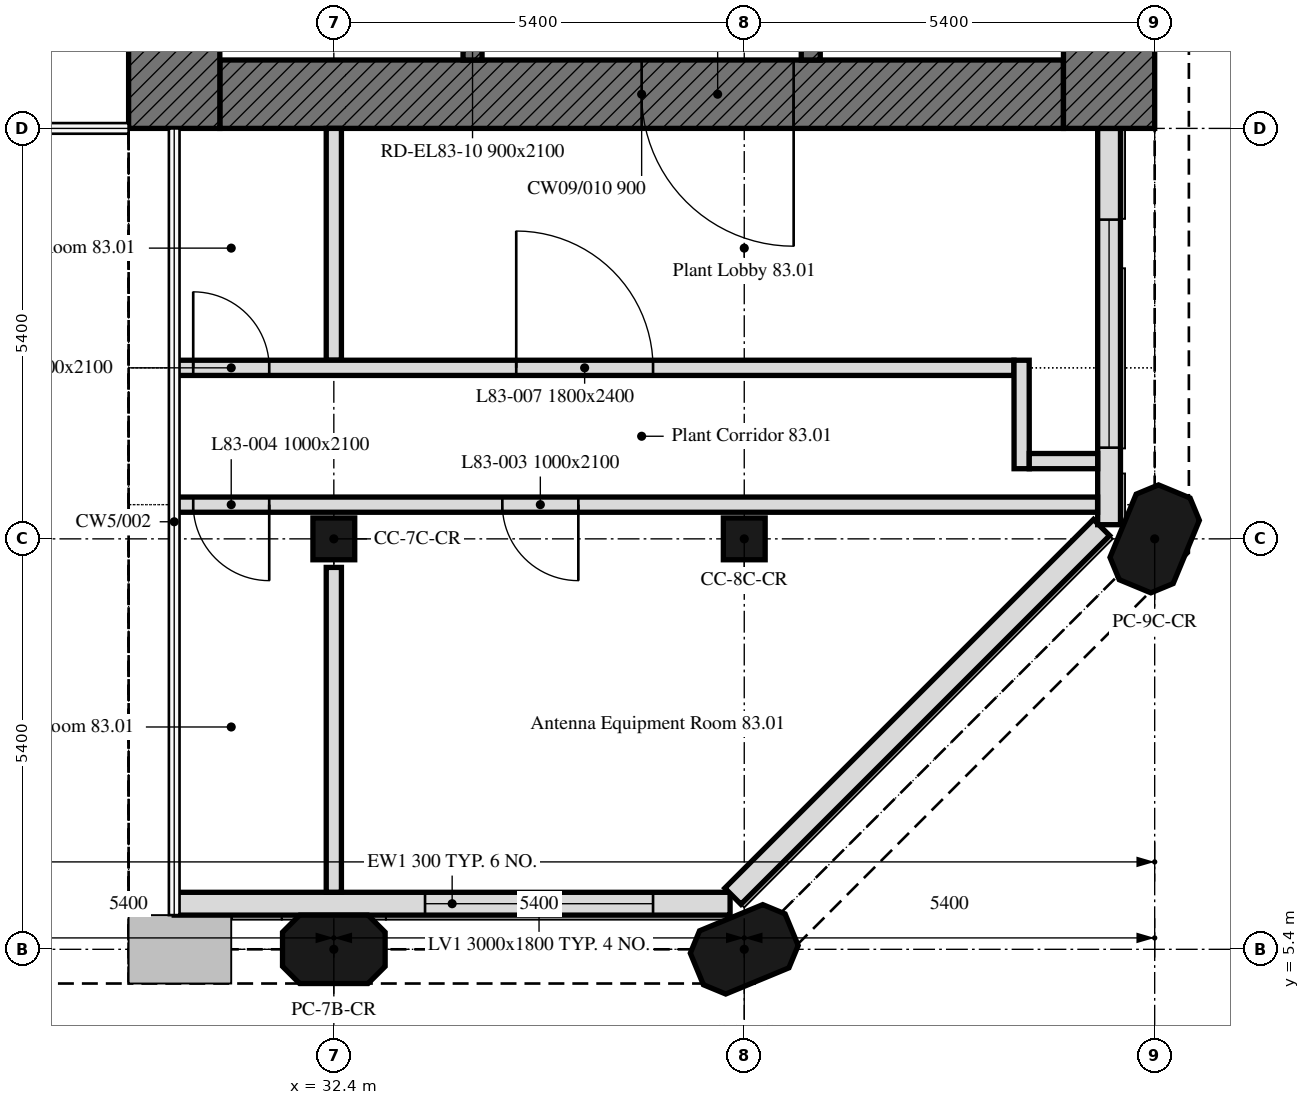
"""IFC4 building model, lengths in metres.
Left out: names, types, materials, properties, quantities, classifications, styles, units other than length and angle.
Written with IfcOpenShell. Run it as: python <this file> out.ifc"""

import sys

from ifc_helpers import new_model, si_unit, direction, frame, frame_2d, origin, origin_2d, place, context, subcontext, project, spatial, polyline, rectangle, outline, extrude, element, fill, save


model = new_model("IFC4")
c1 = context("Model", 3, precision=1e-05, world=origin(), true_north=direction((0.0, 1.0)))
c2 = subcontext(c1, "Body", "Model", "MODEL_VIEW")
j1 = project(units=[si_unit("LENGTHUNIT", "METRE"), si_unit("PLANEANGLEUNIT", "RADIAN")], contexts=[c1])
p1 = place(None, origin())
s1 = spatial("IfcSite", under=j1, at=p1, CompositionType="ELEMENT")
p2 = place(p1, origin())
s2 = spatial("IfcBuilding", under=s1, at=p2, CompositionType="ELEMENT")
p3 = place(p2, frame((0.0, 0.0, 335.2)))
s3 = spatial("IfcBuildingStorey", under=s2, at=p3, CompositionType="ELEMENT", Elevation=335.2)
for number, where, z_axis, x_axis in (
    (1, (32.4, 5.4, 0.0), (0.0, 0.0, 1.0), (1.0, 0.0, 0.0)),
    (2, (37.8, 5.4, 0.0), (0.0, 0.0, 1.0), (0.924, 0.383, 0.0)),
):
    element("IfcColumn", number, at=place(p3, frame(where, z_axis=z_axis, x_axis=x_axis)), inside=s3, PredefinedType="COLUMN", context=c2, shape_type="SweptSolid", body=[
        extrude(outline(polyline([(-0.45, -0.45), (0.45, -0.45), (0.675, -0.225), (0.675, 0.225), (0.45, 0.45), (-0.45, 0.45), (-0.675, 0.225), (-0.675, -0.225), (-0.45, -0.45)])), origin(), (0.0, 0.0, 1.0), 2.7),
    ])
for number, where, z_axis, x_axis in (
    (3, (32.4, 10.8, 0.0), (0.0, 0.0, 1.0), (1.0, 0.0, 0.0)),
    (4, (37.8, 10.8, 0.0), (0.0, 0.0, 1.0), (1.0, 0.0, 0.0)),
):
    element("IfcColumn", number, at=place(p3, frame(where, z_axis=z_axis, x_axis=x_axis)), inside=s3, PredefinedType="COLUMN", context=c2, shape_type="SweptSolid", body=[
        extrude(rectangle(XDim=0.55, YDim=0.55, at=origin_2d()), origin(), (0.0, 0.0, 1.0), 2.7),
    ])
p4 = place(p3, frame((43.2, 10.8, 0.0), z_axis=(0.0, 0.0, 1.0), x_axis=(0.382683432365, 0.923879532511, 0.0)))
e5 = element("IfcColumn", 5, at=p4, inside=s3, PredefinedType="COLUMN", context=c2, shape_type="SweptSolid", body=[
    extrude(outline(polyline([(-0.45, -0.45), (0.45, -0.45), (0.675, -0.225), (0.675, 0.225), (0.45, 0.45), (-0.45, 0.45), (-0.675, 0.225), (-0.675, -0.225), (-0.45, -0.45)])), origin(), (0.0, 0.0, 1.0), 2.7),
])
p5 = place(p3, frame((30.3, 6.0, 0.0), z_axis=(0.0, 0.0, 1.0), x_axis=(1.0, 0.0, 0.0)))
e6 = element("IfcWall", 6, at=p5, inside=s3, PredefinedType="SOLIDWALL", context=c2, shape_type="SweptSolid", body=[
    extrude(outline(polyline([(0.0, 0.0), (7.313, 0.0), (7.314, 6.217), (6.751, 5.967), (6.188, 5.717), (5.626, 5.467), (5.063, 5.217), (4.501, 4.967), (3.938, 4.717), (3.375, 4.467), (2.813, 4.217), (2.25, 3.967), (1.688, 3.717), (1.125, 3.467), (0.562, 3.217), (0.0, 2.967), (0.0, 0.0)])), frame((0.0, 0.15, 0.0), z_axis=(0.0, -1.0, 0.0), x_axis=(1.0, 0.0, 0.0)), (0.0, 0.0, 1.0), 0.3),
])
p6 = place(p5, frame((3.3, 0.0, 0.6)))
e7 = element("IfcOpeningElement", 7, at=p6, cuts=e6, PredefinedType="OPENING", context=c2, shape_type="SweptSolid", body=[
    extrude(rectangle(XDim=3.0, YDim=1.8, at=frame_2d((1.5, 0.9))), frame((0.0, 0.16, 0.0), z_axis=(0.0, -1.0, 0.0), x_axis=(1.0, 0.0, 0.0)), (0.0, 0.0, 1.0), 0.32),
])
p7 = place(p3, frame((37.65, 6.099, 0.0), z_axis=(0.0, 0.0, 1.0), x_axis=(0.707106781187, 0.707106781187, 0.0)))
e8 = element("IfcWall", 8, at=p7, inside=s3, PredefinedType="SOLIDWALL", context=c2, shape_type="SweptSolid", body=[
    extrude(outline(polyline([(0.0, 0.0), (6.86, 0.0), (6.86, 8.389), (6.288, 8.21), (5.716, 8.03), (5.145, 7.85), (4.573, 7.671), (4.001, 7.491), (3.43, 7.312), (2.858, 7.132), (2.287, 6.952), (1.715, 6.772), (1.143, 6.593), (0.572, 6.413), (0.0, 6.234), (0.0, 0.0)])), frame((0.0, 0.15, 0.0), z_axis=(0.0, -1.0, 0.0), x_axis=(1.0, 0.0, 0.0)), (0.0, 0.0, 1.0), 0.3),
])
p8 = place(p3, frame((42.6, 10.986, 0.0), z_axis=(0.0, 0.0, 1.0), x_axis=(0.0, 1.0, 0.0)))
e9 = element("IfcWall", 9, at=p8, inside=s3, PredefinedType="SOLIDWALL", context=c2, shape_type="SweptSolid", body=[
    extrude(outline(polyline([(0.0, 0.0), (5.214, 0.0), (5.214, 8.433), (4.634, 8.433), (4.055, 8.433), (3.476, 8.433), (2.896, 8.433), (2.317, 8.433), (1.738, 8.433), (1.159, 8.433), (0.579, 8.433), (0.0, 8.433), (0.0, 0.0)])), frame((0.0, 0.15, 0.0), z_axis=(0.0, -1.0, 0.0), x_axis=(1.0, 0.0, 0.0)), (0.0, 0.0, 1.0), 0.3),
])
p9 = place(p8, frame((1.014, 0.0, 0.6)))
e10 = element("IfcOpeningElement", 10, at=p9, cuts=e9, PredefinedType="OPENING", context=c2, shape_type="SweptSolid", body=[
    extrude(rectangle(XDim=3.0, YDim=1.8, at=frame_2d((1.5, 0.9))), frame((0.0, 0.16, 0.0), z_axis=(0.0, -1.0, 0.0), x_axis=(1.0, 0.0, 0.0)), (0.0, 0.0, 1.0), 0.32),
])
p10 = place(p3, frame((42.0, 16.65, 0.0), z_axis=(0.0, 0.0, 1.0), x_axis=(-1.0, 0.0, 0.0)))
e11 = element("IfcWall", 11, at=p10, inside=s3, PredefinedType="SOLIDWALL", context=c2, shape_type="SweptSolid", body=[
    extrude(outline(polyline([(0.0, 0.0), (11.1, 0.0), (11.1, 3.233), (0.0, 8.167), (0.0, 0.0)])), frame((0.0, 0.45, 0.0), z_axis=(0.0, -1.0, 0.0), x_axis=(1.0, 0.0, 0.0)), (0.0, 0.0, 1.0), 0.9),
])
p11 = place(p10, frame((3.55, 0.0, 0.0)))
e12 = element("IfcOpeningElement", 12, at=p11, cuts=e11, PredefinedType="OPENING", context=c2, shape_type="SweptSolid", body=[
    extrude(rectangle(XDim=2.0, YDim=2.4, at=frame_2d((1.0, 1.2))), frame((0.0, 0.45, 0.0), z_axis=(0.0, -1.0, 0.0), x_axis=(1.0, 0.0, 0.0)), (0.0, 0.0, 1.0), 0.9),
])
p12 = place(p3, frame((42.6, 32.4, 0.0), z_axis=(0.0, 0.0, 1.0), x_axis=(0.0, -1.0, 0.0)))
e13 = element("IfcWall", 13, at=p12, inside=s3, PredefinedType="SOLIDWALL", context=c2, shape_type="SweptSolid", body=[
    extrude(rectangle(XDim=16.2, YDim=1.2, at=frame_2d((8.1, 0.0))), origin(), (0.0, 0.0, 1.0), 8.433),
])
p13 = place(p3, frame((30.3, 16.2, 0.0), z_axis=(0.0, 0.0, 1.0), x_axis=(0.0, 1.0, 0.0)))
e14 = element("IfcWall", 14, at=p13, inside=s3, PredefinedType="SOLIDWALL", context=c2, shape_type="SweptSolid", body=[
    extrude(rectangle(XDim=16.2, YDim=1.2, at=frame_2d((8.1, 0.0))), origin(), (0.0, 0.0, 1.0), 2.967),
])
p14 = place(p3, frame((38.675, 17.1, 0.0), z_axis=(0.0, 0.0, 1.0), x_axis=(0.0, 1.0, 0.0)))
e15 = element("IfcWall", 15, at=p14, inside=s3, PredefinedType="SOLIDWALL", context=c2, shape_type="SweptSolid", body=[
    extrude(rectangle(XDim=14.4, YDim=0.25, at=frame_2d((7.2, 0.0))), origin(), (0.0, 0.0, 1.0), 6.689),
])
p15 = place(p14, frame((4.6, 0.0, 0.0)))
e16 = element("IfcOpeningElement", 16, at=p15, cuts=e15, PredefinedType="OPENING", context=c2, shape_type="SweptSolid", body=[
    extrude(rectangle(XDim=1.0, YDim=2.1, at=frame_2d((0.5, 1.05))), frame((0.0, 0.125, 0.0), z_axis=(0.0, -1.0, 0.0), x_axis=(1.0, 0.0, 0.0)), (0.0, 0.0, 1.0), 0.25),
])
p16 = place(p14, frame((7.062, 0.0, 0.0)))
e17 = element("IfcOpeningElement", 17, at=p16, cuts=e15, PredefinedType="OPENING", context=c2, shape_type="SweptSolid", body=[
    extrude(rectangle(XDim=1.2, YDim=2.1, at=frame_2d((0.6, 1.05))), frame((0.0, 0.125, 0.0), z_axis=(0.0, -1.0, 0.0), x_axis=(1.0, 0.0, 0.0)), (0.0, 0.0, 1.0), 0.25),
])
p17 = place(p14, frame((10.106, 0.0, 0.0)))
e18 = element("IfcOpeningElement", 18, at=p17, cuts=e15, PredefinedType="OPENING", context=c2, shape_type="SweptSolid", body=[
    extrude(rectangle(XDim=0.9, YDim=2.1, at=frame_2d((0.45, 1.05))), frame((0.0, 0.125, 0.0), z_axis=(0.0, -1.0, 0.0), x_axis=(1.0, 0.0, 0.0)), (0.0, 0.0, 1.0), 0.25),
])
p18 = place(p14, frame((12.719, 0.0, 0.0)))
e19 = element("IfcOpeningElement", 19, at=p18, cuts=e15, PredefinedType="OPENING", context=c2, shape_type="SweptSolid", body=[
    extrude(rectangle(XDim=0.9, YDim=2.1, at=frame_2d((0.45, 1.05))), frame((0.0, 0.125, 0.0), z_axis=(0.0, -1.0, 0.0), x_axis=(1.0, 0.0, 0.0)), (0.0, 0.0, 1.0), 0.25),
])
p19 = place(p3, frame((34.225, 17.1, 0.0), z_axis=(0.0, 0.0, 1.0), x_axis=(0.0, 1.0, 0.0)))
e20 = element("IfcWall", 20, at=p19, inside=s3, PredefinedType="SOLIDWALL", context=c2, shape_type="SweptSolid", body=[
    extrude(rectangle(XDim=14.4, YDim=0.25, at=frame_2d((7.2, 0.0))), origin(), (0.0, 0.0, 1.0), 4.711),
])
p20 = place(p19, frame((13.15, 0.0, 0.0)))
e21 = element("IfcOpeningElement", 21, at=p20, cuts=e20, PredefinedType="OPENING", context=c2, shape_type="SweptSolid", body=[
    extrude(rectangle(XDim=1.0, YDim=2.1, at=frame_2d((0.5, 1.05))), frame((0.0, 0.125, 0.0), z_axis=(0.0, -1.0, 0.0), x_axis=(1.0, 0.0, 0.0)), (0.0, 0.0, 1.0), 0.25),
])
p21 = place(p19, frame((0.24, 0.0, 0.0)))
e22 = element("IfcOpeningElement", 22, at=p21, cuts=e20, PredefinedType="OPENING", context=c2, shape_type="SweptSolid", body=[
    extrude(rectangle(XDim=0.9, YDim=2.1, at=frame_2d((0.45, 1.05))), frame((0.0, 0.125, 0.0), z_axis=(0.0, -1.0, 0.0), x_axis=(1.0, 0.0, 0.0)), (0.0, 0.0, 1.0), 0.25),
])
p22 = place(p19, frame((2.74, 0.0, 0.0)))
e23 = element("IfcOpeningElement", 23, at=p22, cuts=e20, PredefinedType="OPENING", context=c2, shape_type="SweptSolid", body=[
    extrude(rectangle(XDim=0.9, YDim=2.1, at=frame_2d((0.45, 1.05))), frame((0.0, 0.125, 0.0), z_axis=(0.0, -1.0, 0.0), x_axis=(1.0, 0.0, 0.0)), (0.0, 0.0, 1.0), 0.25),
])
p23 = place(p19, frame((6.175, 0.0, 0.0)))
e24 = element("IfcOpeningElement", 24, at=p23, cuts=e20, PredefinedType="OPENING", context=c2, shape_type="SweptSolid", body=[
    extrude(rectangle(XDim=0.9, YDim=2.1, at=frame_2d((0.45, 1.05))), frame((0.0, 0.125, 0.0), z_axis=(0.0, -1.0, 0.0), x_axis=(1.0, 0.0, 0.0)), (0.0, 0.0, 1.0), 0.25),
])
p24 = place(p3, frame((32.4, 10.424, 0.0), z_axis=(0.0, 0.0, 1.0), x_axis=(0.0, -1.0, 0.0)))
e25 = element("IfcWall", 25, at=p24, inside=s3, PredefinedType="PARTITIONING", context=c2, shape_type="SweptSolid", body=[
    extrude(rectangle(XDim=4.273, YDim=0.2, at=frame_2d((2.137, 0.0))), origin(), (0.0, 0.0, 1.0), 3.9),
])
p25 = place(p3, frame((42.449, 11.25, 0.0), z_axis=(0.0, 0.0, 1.0), x_axis=(-1.0, 0.0, 0.0)))
e26 = element("IfcWall", 26, at=p25, inside=s3, PredefinedType="PARTITIONING", context=c2, shape_type="SweptSolid", body=[
    extrude(outline(polyline([(0.0, 0.0), (12.149, 0.0), (12.149, 2.967), (0.0, 8.366), (0.0, 0.0)])), frame((0.0, 0.1, 0.0), z_axis=(0.0, -1.0, 0.0), x_axis=(1.0, 0.0, 0.0)), (0.0, 0.0, 1.0), 0.2),
])
p26 = place(p25, frame((6.832, 0.0, 0.0)))
e27 = element("IfcOpeningElement", 27, at=p26, cuts=e26, PredefinedType="OPENING", context=c2, shape_type="SweptSolid", body=[
    extrude(rectangle(XDim=1.0, YDim=2.1, at=frame_2d((0.5, 1.05))), frame((0.0, 0.1, 0.0), z_axis=(0.0, -1.0, 0.0), x_axis=(1.0, 0.0, 0.0)), (0.0, 0.0, 1.0), 0.2),
])
p27 = place(p25, frame((10.899, 0.0, 0.0)))
e28 = element("IfcOpeningElement", 28, at=p27, cuts=e26, PredefinedType="OPENING", context=c2, shape_type="SweptSolid", body=[
    extrude(rectangle(XDim=1.0, YDim=2.1, at=frame_2d((0.5, 1.05))), frame((0.0, 0.1, 0.0), z_axis=(0.0, -1.0, 0.0), x_axis=(1.0, 0.0, 0.0)), (0.0, 0.0, 1.0), 0.2),
])
p28 = place(p3, frame((32.4, 13.15, 0.0), z_axis=(0.0, 0.0, 1.0), x_axis=(0.0, 1.0, 0.0)))
e29 = element("IfcWall", 29, at=p28, inside=s3, PredefinedType="PARTITIONING", context=c2, shape_type="SweptSolid", body=[
    extrude(rectangle(XDim=3.05, YDim=0.2, at=frame_2d((1.525, 0.0))), origin(), (0.0, 0.0, 1.0), 3.9),
])
p29 = place(p3, frame((30.3, 13.05, 0.0), z_axis=(0.0, 0.0, 1.0), x_axis=(1.0, 0.0, 0.0)))
e30 = element("IfcWall", 30, at=p29, inside=s3, PredefinedType="PARTITIONING", context=c2, shape_type="SweptSolid", body=[
    extrude(outline(polyline([(0.0, 0.0), (11.049, 0.0), (11.049, 7.877), (0.0, 2.967), (0.0, 0.0)])), frame((0.0, 0.1, 0.0), z_axis=(0.0, -1.0, 0.0), x_axis=(1.0, 0.0, 0.0)), (0.0, 0.0, 1.0), 0.2),
])
p30 = place(p29, frame((0.25, 0.0, 0.0)))
e31 = element("IfcOpeningElement", 31, at=p30, cuts=e30, PredefinedType="OPENING", context=c2, shape_type="SweptSolid", body=[
    extrude(rectangle(XDim=1.0, YDim=2.1, at=frame_2d((0.5, 1.05))), frame((0.0, 0.1, 0.0), z_axis=(0.0, -1.0, 0.0), x_axis=(1.0, 0.0, 0.0)), (0.0, 0.0, 1.0), 0.2),
])
p31 = place(p29, frame((4.5, 0.0, 0.0)))
e32 = element("IfcOpeningElement", 32, at=p31, cuts=e30, PredefinedType="OPENING", context=c2, shape_type="SweptSolid", body=[
    extrude(rectangle(XDim=1.8, YDim=2.4, at=frame_2d((0.9, 1.2))), frame((0.0, 0.1, 0.0), z_axis=(0.0, -1.0, 0.0), x_axis=(1.0, 0.0, 0.0)), (0.0, 0.0, 1.0), 0.2),
])
p32 = place(p3, frame((41.449, 13.15, 0.0), z_axis=(0.0, 0.0, 1.0), x_axis=(0.00085543168, -0.999999634118, 0.0)))
e33 = element("IfcWall", 33, at=p32, inside=s3, PredefinedType="PARTITIONING", context=c2, shape_type="SweptSolid", body=[
    extrude(rectangle(XDim=1.427, YDim=0.2, at=frame_2d((0.713, 0.0))), origin(), (0.0, 0.0, 1.0), 7.922),
])
p33 = place(p3, frame((41.55, 11.823, 0.0), z_axis=(0.0, 0.0, 1.0), x_axis=(1.0, 0.0, 0.0)))
e34 = element("IfcWall", 34, at=p33, inside=s3, PredefinedType="PARTITIONING", context=c2, shape_type="SweptSolid", body=[
    extrude(outline(polyline([(0.0, 0.0), (0.9, 0.0), (0.9, 8.367), (0.0, 7.967), (0.0, 0.0)])), frame((0.0, 0.1, 0.0), z_axis=(0.0, -1.0, 0.0), x_axis=(1.0, 0.0, 0.0)), (0.0, 0.0, 1.0), 0.2),
])
p34 = place(p6, origin())
e35 = element("IfcWindow", 35, at=p34, inside=s3, PartitioningType="SINGLE_PANEL", PredefinedType="WINDOW", context=c2, shape_type="SweptSolid", body=[
    extrude(rectangle(XDim=3.0, YDim=1.8, at=frame_2d((1.5, 0.9))), frame((0.0, 0.03, 0.0), z_axis=(0.0, -1.0, 0.0), x_axis=(1.0, 0.0, 0.0)), (0.0, 0.0, 1.0), 0.06),
])
fill(e7, e35)
p35 = place(p9, origin())
e36 = element("IfcWindow", 36, at=p35, inside=s3, PartitioningType="SINGLE_PANEL", PredefinedType="WINDOW", context=c2, shape_type="SweptSolid", body=[
    extrude(rectangle(XDim=3.0, YDim=1.8, at=frame_2d((1.5, 0.9))), frame((0.0, 0.03, 0.0), z_axis=(0.0, -1.0, 0.0), x_axis=(1.0, 0.0, 0.0)), (0.0, 0.0, 1.0), 0.06),
])
fill(e10, e36)
p36 = place(p11, origin())
e37 = element("IfcDoor", 37, at=p36, inside=s3, OperationType="DOUBLE_DOOR_SINGLE_SWING", PredefinedType="DOOR", context=c2, shape_type="SweptSolid", body=[
    extrude(rectangle(XDim=2.0, YDim=2.4, at=frame_2d((1.0, 1.2))), frame((0.0, 0.025, 0.0), z_axis=(0.0, -1.0, 0.0), x_axis=(1.0, 0.0, 0.0)), (0.0, 0.0, 1.0), 0.05),
])
fill(e12, e37)
p37 = place(p26, origin())
e38 = element("IfcDoor", 38, at=p37, inside=s3, OperationType="SINGLE_SWING_LEFT", PredefinedType="DOOR", context=c2, shape_type="SweptSolid", body=[
    extrude(rectangle(XDim=1.0, YDim=2.1, at=frame_2d((0.5, 1.05))), frame((0.0, 0.025, 0.0), z_axis=(0.0, -1.0, 0.0), x_axis=(1.0, 0.0, 0.0)), (0.0, 0.0, 1.0), 0.05),
])
fill(e27, e38)
p38 = place(p27, origin())
e39 = element("IfcDoor", 39, at=p38, inside=s3, OperationType="SINGLE_SWING_RIGHT", PredefinedType="DOOR", context=c2, shape_type="SweptSolid", body=[
    extrude(rectangle(XDim=1.0, YDim=2.1, at=frame_2d((0.5, 1.05))), frame((0.0, 0.025, 0.0), z_axis=(0.0, -1.0, 0.0), x_axis=(1.0, 0.0, 0.0)), (0.0, 0.0, 1.0), 0.05),
])
fill(e28, e39)
p39 = place(p30, origin())
e40 = element("IfcDoor", 40, at=p39, inside=s3, OperationType="SINGLE_SWING_LEFT", PredefinedType="DOOR", context=c2, shape_type="SweptSolid", body=[
    extrude(rectangle(XDim=1.0, YDim=2.1, at=frame_2d((0.5, 1.05))), frame((0.0, 0.025, 0.0), z_axis=(0.0, -1.0, 0.0), x_axis=(1.0, 0.0, 0.0)), (0.0, 0.0, 1.0), 0.05),
])
fill(e31, e40)
p40 = place(p31, origin())
e41 = element("IfcDoor", 41, at=p40, inside=s3, OperationType="DOUBLE_DOOR_SINGLE_SWING", PredefinedType="DOOR", context=c2, shape_type="SweptSolid", body=[
    extrude(rectangle(XDim=1.8, YDim=2.4, at=frame_2d((0.9, 1.2))), frame((0.0, 0.025, 0.0), z_axis=(0.0, -1.0, 0.0), x_axis=(1.0, 0.0, 0.0)), (0.0, 0.0, 1.0), 0.05),
])
fill(e32, e41)
save(model, sys.argv[1])
